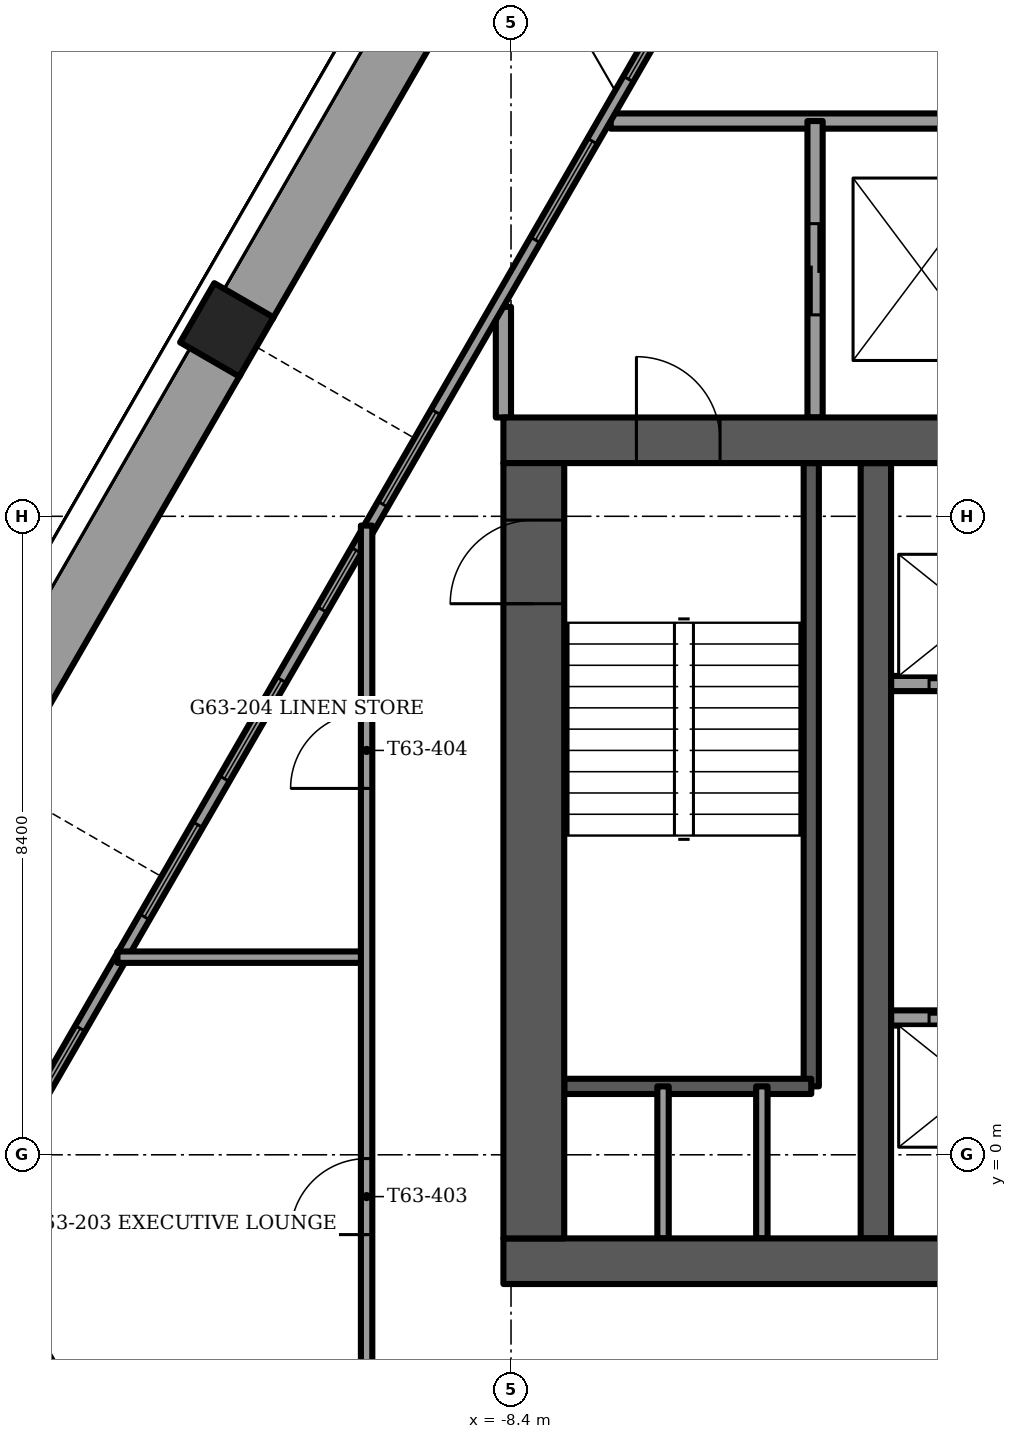
"""IFC4 building model, lengths in metres.
Left out: names, types, materials, properties, quantities, classifications, styles, units other than length and angle.
Written with IfcOpenShell. Run it as: python <this file> out.ifc"""

import sys

from ifc_helpers import new_model, si_unit, direction, frame, frame_2d, origin, origin_2d, place, context, subcontext, project, spatial, rectangle, extrude, element, fill, save


model = new_model("IFC4")
c1 = context("Model", 3, precision=1e-05, world=origin(), true_north=direction((0.0, 1.0)))
c2 = subcontext(c1, "Body", "Model", "MODEL_VIEW")
j1 = project(units=[si_unit("LENGTHUNIT", "METRE"), si_unit("PLANEANGLEUNIT", "RADIAN")], contexts=[c1])
p1 = place(None, origin())
s1 = spatial("IfcSite", under=j1, at=p1, CompositionType="ELEMENT")
p2 = place(p1, origin())
s2 = spatial("IfcBuilding", under=s1, at=p2, CompositionType="ELEMENT")
p3 = place(p2, frame((0.0, 0.0, 256.25)))
s3 = spatial("IfcBuildingStorey", under=s2, at=p3, CompositionType="ELEMENT", Elevation=256.25)
p4 = place(p3, frame((-12.139, 10.853, -1.2), z_axis=(0.0, 0.0, 1.0), x_axis=(0.5, 0.866025403784, 0.0)))
e1 = element("IfcColumn", 1, at=p4, inside=s3, PredefinedType="COLUMN", context=c2, shape_type="SweptSolid", body=[
    extrude(rectangle(XDim=0.9, YDim=0.9, at=origin_2d()), origin(), (0.0, 0.0, 1.0), 3.75),
])
p5 = place(p3, frame((-8.5, -1.4, -0.3), z_axis=(0.0, 0.0, 1.0), x_axis=(1.0, 0.0, 0.0)))
e2 = element("IfcWall", 2, at=p5, inside=s3, PredefinedType="SHEAR", context=c2, shape_type="SweptSolid", body=[
    extrude(rectangle(XDim=17.0, YDim=0.6, at=frame_2d((8.5, 0.0))), origin(), (0.0, 0.0, 1.0), 3.75),
])
p6 = place(p5, frame((7.7, 0.0, 0.0)))
e3 = element("IfcOpeningElement", 3, at=p6, cuts=e2, PredefinedType="OPENING", context=c2, shape_type="SweptSolid", body=[
    extrude(rectangle(XDim=1.6, YDim=2.1, at=frame_2d((0.8, 1.05))), frame((0.0, 0.3, 0.0), z_axis=(0.0, -1.0, 0.0), x_axis=(1.0, 0.0, 0.0)), (0.0, 0.0, 1.0), 0.6),
])
p7 = place(p3, frame((-8.5, 9.4, -0.3), z_axis=(0.0, 0.0, 1.0), x_axis=(1.0, 0.0, 0.0)))
e4 = element("IfcWall", 4, at=p7, inside=s3, PredefinedType="SHEAR", context=c2, shape_type="SweptSolid", body=[
    extrude(rectangle(XDim=17.0, YDim=0.6, at=frame_2d((8.5, 0.0))), origin(), (0.0, 0.0, 1.0), 3.75),
])
p8 = place(p7, frame((7.7, 0.0, 0.0)))
e5 = element("IfcOpeningElement", 5, at=p8, cuts=e4, PredefinedType="OPENING", context=c2, shape_type="SweptSolid", body=[
    extrude(rectangle(XDim=1.6, YDim=2.1, at=frame_2d((0.8, 1.05))), frame((0.0, 0.3, 0.0), z_axis=(0.0, -1.0, 0.0), x_axis=(1.0, 0.0, 0.0)), (0.0, 0.0, 1.0), 0.6),
])
p9 = place(p7, frame((1.75, 0.0, 0.0)))
e6 = element("IfcOpeningElement", 6, at=p9, cuts=e4, PredefinedType="OPENING", context=c2, shape_type="SweptSolid", body=[
    extrude(rectangle(XDim=1.1, YDim=2.1, at=frame_2d((0.55, 1.05))), frame((0.0, 0.3, 0.0), z_axis=(0.0, -1.0, 0.0), x_axis=(1.0, 0.0, 0.0)), (0.0, 0.0, 1.0), 0.6),
])
p10 = place(p7, frame((14.15, 0.0, 0.0)))
e7 = element("IfcOpeningElement", 7, at=p10, cuts=e4, PredefinedType="OPENING", context=c2, shape_type="SweptSolid", body=[
    extrude(rectangle(XDim=1.1, YDim=2.1, at=frame_2d((0.55, 1.05))), frame((0.0, 0.3, 0.0), z_axis=(0.0, -1.0, 0.0), x_axis=(1.0, 0.0, 0.0)), (0.0, 0.0, 1.0), 0.6),
])
p11 = place(p3, frame((-8.1, -1.1, -0.3), z_axis=(0.0, 0.0, 1.0), x_axis=(0.0, 1.0, 0.0)))
e8 = element("IfcWall", 8, at=p11, inside=s3, PredefinedType="SHEAR", context=c2, shape_type="SweptSolid", body=[
    extrude(rectangle(XDim=10.2, YDim=0.8, at=frame_2d((5.1, 0.0))), origin(), (0.0, 0.0, 1.0), 3.75),
])
p12 = place(p11, frame((8.35, 0.0, 0.0)))
e9 = element("IfcOpeningElement", 9, at=p12, cuts=e8, PredefinedType="OPENING", context=c2, shape_type="SweptSolid", body=[
    extrude(rectangle(XDim=1.1, YDim=2.1, at=frame_2d((0.55, 1.05))), frame((0.0, 0.4, 0.0), z_axis=(0.0, -1.0, 0.0), x_axis=(1.0, 0.0, 0.0)), (0.0, 0.0, 1.0), 0.8),
])
p13 = place(p3, frame((-3.6, -1.1, -0.3), z_axis=(0.0, 0.0, 1.0), x_axis=(0.0, 1.0, 0.0)))
e10 = element("IfcWall", 10, at=p13, inside=s3, PredefinedType="SHEAR", context=c2, shape_type="SweptSolid", body=[
    extrude(rectangle(XDim=10.2, YDim=0.4, at=frame_2d((5.1, 0.0))), origin(), (0.0, 0.0, 1.0), 3.75),
])
p14 = place(p3, frame((-8.92, 16.428, 0.0), z_axis=(0.0, 0.0, 1.0), x_axis=(-0.500026811154, -0.866009923804, 0.0)))
e11 = element("IfcWall", 11, at=p14, inside=s3, PredefinedType="PARAPET", context=c2, shape_type="SweptSolid", body=[
    extrude(rectangle(XDim=6.018, YDim=0.9, at=frame_2d((3.009, 0.0))), origin(), (0.0, 0.0, 1.0), 1.1),
])
p15 = place(p3, frame((-12.349, 10.489, 0.0), z_axis=(0.0, 0.0, 1.0), x_axis=(-0.500015433515, -0.866016493057, 0.0)))
e12 = element("IfcWall", 12, at=p15, inside=s3, PredefinedType="PARAPET", context=c2, shape_type="SweptSolid", body=[
    extrude(rectangle(XDim=5.819, YDim=0.9, at=frame_2d((2.909, 0.0))), origin(), (0.0, 0.0, 1.0), 1.1),
])
p16 = place(p3, frame((-5.909, 15.792, 0.0), z_axis=(0.0, 0.0, 1.0), x_axis=(-0.500006153997, -0.866021850744, 0.0)))
e13 = element("IfcWall", 13, at=p16, inside=s3, PredefinedType="SOLIDWALL", context=c2, shape_type="SweptSolid", body=[
    extrude(rectangle(XDim=18.673, YDim=0.15, at=frame_2d((9.336, 0.0))), origin(), (0.0, 0.0, 1.0), 3.45),
])
p17 = place(p16, frame((2.838, 0.0, 0.15)))
e14 = element("IfcOpeningElement", 14, at=p17, cuts=e13, PredefinedType="OPENING", context=c2, shape_type="SweptSolid", body=[
    extrude(rectangle(XDim=1.5, YDim=2.85, at=frame_2d((0.75, 1.425))), frame((0.0, 0.075, 0.0), z_axis=(0.0, -1.0, 0.0), x_axis=(1.0, 0.0, 0.0)), (0.0, 0.0, 1.0), 0.15),
])
p18 = place(p16, frame((9.053, 0.0, 0.15)))
e15 = element("IfcOpeningElement", 15, at=p18, cuts=e13, PredefinedType="OPENING", context=c2, shape_type="SweptSolid", body=[
    extrude(rectangle(XDim=0.9, YDim=2.85, at=frame_2d((0.45, 1.425))), frame((0.0, 0.075, 0.0), z_axis=(0.0, -1.0, 0.0), x_axis=(1.0, 0.0, 0.0)), (0.0, 0.0, 1.0), 0.15),
])
p19 = place(p16, frame((6.953, 0.0, 0.15)))
e16 = element("IfcOpeningElement", 16, at=p19, cuts=e13, PredefinedType="OPENING", context=c2, shape_type="SweptSolid", body=[
    extrude(rectangle(XDim=1.4, YDim=2.85, at=frame_2d((0.7, 1.425))), frame((0.0, 0.075, 0.0), z_axis=(0.0, -1.0, 0.0), x_axis=(1.0, 0.0, 0.0)), (0.0, 0.0, 1.0), 0.15),
])
p20 = place(p16, frame((11.022, 0.0, 0.15)))
e17 = element("IfcOpeningElement", 17, at=p20, cuts=e13, PredefinedType="OPENING", context=c2, shape_type="SweptSolid", body=[
    extrude(rectangle(XDim=1.5, YDim=2.85, at=frame_2d((0.75, 1.425))), frame((0.0, 0.075, 0.0), z_axis=(0.0, -1.0, 0.0), x_axis=(1.0, 0.0, 0.0)), (0.0, 0.0, 1.0), 0.15),
])
p21 = place(p16, frame((13.222, 0.0, 0.15)))
e18 = element("IfcOpeningElement", 18, at=p21, cuts=e13, PredefinedType="OPENING", context=c2, shape_type="SweptSolid", body=[
    extrude(rectangle(XDim=1.4, YDim=2.85, at=frame_2d((0.7, 1.425))), frame((0.0, 0.075, 0.0), z_axis=(0.0, -1.0, 0.0), x_axis=(1.0, 0.0, 0.0)), (0.0, 0.0, 1.0), 0.15),
])
p22 = place(p16, frame((0.394, 0.0, 0.15)))
e19 = element("IfcOpeningElement", 19, at=p22, cuts=e13, PredefinedType="OPENING", context=c2, shape_type="SweptSolid", body=[
    extrude(rectangle(XDim=1.5, YDim=2.73, at=frame_2d((0.75, 1.365))), frame((0.0, 0.075, 0.0), z_axis=(0.0, -1.0, 0.0), x_axis=(1.0, 0.0, 0.0)), (0.0, 0.0, 1.0), 0.15),
])
p23 = place(p16, frame((16.316, 0.0, 0.15)))
e20 = element("IfcOpeningElement", 20, at=p23, cuts=e13, PredefinedType="OPENING", context=c2, shape_type="SweptSolid", body=[
    extrude(rectangle(XDim=1.5, YDim=2.73, at=frame_2d((0.75, 1.365))), frame((0.0, 0.075, 0.0), z_axis=(0.0, -1.0, 0.0), x_axis=(1.0, 0.0, 0.0)), (0.0, 0.0, 1.0), 0.15),
])
p24 = place(p3, frame((-15.246, -1.444, 0.0), z_axis=(0.0, 0.0, 1.0), x_axis=(0.500005990458, -0.866021945164, 0.0)))
e21 = element("IfcWall", 21, at=p24, inside=s3, PredefinedType="SOLIDWALL", context=c2, shape_type="SweptSolid", body=[
    extrude(rectangle(XDim=12.745, YDim=0.15, at=frame_2d((6.373, 0.0))), origin(), (0.0, 0.0, 1.0), 3.45),
])
p25 = place(p24, frame((2.93, 0.0, 0.15)))
e22 = element("IfcOpeningElement", 22, at=p25, cuts=e21, PredefinedType="OPENING", context=c2, shape_type="SweptSolid", body=[
    extrude(rectangle(XDim=1.5, YDim=2.85, at=frame_2d((0.75, 1.425))), frame((0.0, 0.075, 0.0), z_axis=(0.0, -1.0, 0.0), x_axis=(1.0, 0.0, 0.0)), (0.0, 0.0, 1.0), 0.15),
])
p26 = place(p24, frame((4.673, 0.0, 0.15)))
e23 = element("IfcOpeningElement", 23, at=p26, cuts=e21, PredefinedType="OPENING", context=c2, shape_type="SweptSolid", body=[
    extrude(rectangle(XDim=1.4, YDim=2.85, at=frame_2d((0.7, 1.425))), frame((0.0, 0.075, 0.0), z_axis=(0.0, -1.0, 0.0), x_axis=(1.0, 0.0, 0.0)), (0.0, 0.0, 1.0), 0.15),
])
p27 = place(p24, frame((6.673, 0.0, 0.15)))
e24 = element("IfcOpeningElement", 24, at=p27, cuts=e21, PredefinedType="OPENING", context=c2, shape_type="SweptSolid", body=[
    extrude(rectangle(XDim=1.5, YDim=2.85, at=frame_2d((0.75, 1.425))), frame((0.0, 0.075, 0.0), z_axis=(0.0, -1.0, 0.0), x_axis=(1.0, 0.0, 0.0)), (0.0, 0.0, 1.0), 0.15),
])
p28 = place(p24, frame((8.873, 0.0, 0.15)))
e25 = element("IfcOpeningElement", 25, at=p28, cuts=e21, PredefinedType="OPENING", context=c2, shape_type="SweptSolid", body=[
    extrude(rectangle(XDim=1.4, YDim=2.85, at=frame_2d((0.7, 1.425))), frame((0.0, 0.075, 0.0), z_axis=(0.0, -1.0, 0.0), x_axis=(1.0, 0.0, 0.0)), (0.0, 0.0, 1.0), 0.15),
])
p29 = place(p24, frame((0.286, 0.0, 0.15)))
e26 = element("IfcOpeningElement", 26, at=p29, cuts=e21, PredefinedType="OPENING", context=c2, shape_type="SweptSolid", body=[
    extrude(rectangle(XDim=1.5, YDim=2.73, at=frame_2d((0.75, 1.365))), frame((0.0, 0.075, 0.0), z_axis=(0.0, -1.0, 0.0), x_axis=(1.0, 0.0, 0.0)), (0.0, 0.0, 1.0), 0.15),
])
p30 = place(p3, frame((-3.4, 1.8, 0.0), z_axis=(0.0, 0.0, 1.0), x_axis=(1.0, 0.0, 0.0)))
e27 = element("IfcWall", 27, at=p30, inside=s3, PredefinedType="PARTITIONING", context=c2, shape_type="SweptSolid", body=[
    extrude(rectangle(XDim=2.3, YDim=0.2, at=frame_2d((1.15, 0.0))), origin(), (0.0, 0.0, 1.0), 3.45),
])
p31 = place(p30, frame((0.5, 0.0, 0.0)))
e28 = element("IfcOpeningElement", 28, at=p31, cuts=e27, PredefinedType="OPENING", context=c2, shape_type="SweptSolid", body=[
    extrude(rectangle(XDim=1.2, YDim=2.1, at=frame_2d((0.6, 1.05))), frame((0.0, 0.1, 0.0), z_axis=(0.0, -1.0, 0.0), x_axis=(1.0, 0.0, 0.0)), (0.0, 0.0, 1.0), 0.2),
])
p32 = place(p3, frame((-3.4, 6.2, 0.0), z_axis=(0.0, 0.0, 1.0), x_axis=(1.0, 0.0, 0.0)))
e29 = element("IfcWall", 29, at=p32, inside=s3, PredefinedType="PARTITIONING", context=c2, shape_type="SweptSolid", body=[
    extrude(rectangle(XDim=2.3, YDim=0.2, at=frame_2d((1.15, 0.0))), origin(), (0.0, 0.0, 1.0), 3.45),
])
p33 = place(p32, frame((0.5, 0.0, 0.0)))
e30 = element("IfcOpeningElement", 30, at=p33, cuts=e29, PredefinedType="OPENING", context=c2, shape_type="SweptSolid", body=[
    extrude(rectangle(XDim=1.2, YDim=2.1, at=frame_2d((0.6, 1.05))), frame((0.0, 0.1, 0.0), z_axis=(0.0, -1.0, 0.0), x_axis=(1.0, 0.0, 0.0)), (0.0, 0.0, 1.0), 0.2),
])
p34 = place(p3, frame((-4.45, 0.9, -0.3), z_axis=(0.0, 0.0, 1.0), x_axis=(0.0, 1.0, 0.0)))
e31 = element("IfcWall", 31, at=p34, inside=s3, PredefinedType="SOLIDWALL", context=c2, shape_type="SweptSolid", body=[
    extrude(rectangle(XDim=8.2, YDim=0.2, at=frame_2d((4.1, 0.0))), origin(), (0.0, 0.0, 1.0), 3.75),
])
p35 = place(p3, frame((-7.7, 0.9, -0.3), z_axis=(0.0, 0.0, 1.0), x_axis=(1.0, 0.0, 0.0)))
e32 = element("IfcWall", 32, at=p35, inside=s3, PredefinedType="SOLIDWALL", context=c2, shape_type="SweptSolid", body=[
    extrude(rectangle(XDim=3.25, YDim=0.2, at=frame_2d((1.625, 0.0))), origin(), (0.0, 0.0, 1.0), 3.75),
])
for number, where, z_axis, x_axis in (
    (33, (-6.4, -1.1, 0.0), (0.0, 0.0, 1.0), (0.0, 1.0, 0.0)),
    (34, (-5.1, -1.1, 0.0), (0.0, 0.0, 1.0), (0.0, 1.0, 0.0)),
):
    element("IfcWall", number, at=place(p3, frame(where, z_axis=z_axis, x_axis=x_axis)), inside=s3, PredefinedType="PARTITIONING", context=c2, shape_type="SweptSolid", body=[
        extrude(rectangle(XDim=2.0, YDim=0.15, at=frame_2d((1.0, 0.0))), origin(), (0.0, 0.0, 1.0), 3.45),
    ])
p36 = place(p3, frame((-7.089, 13.6, 0.0), z_axis=(0.0, 0.0, 1.0), x_axis=(1.0, 0.0, 0.0)))
e35 = element("IfcWall", 35, at=p36, inside=s3, PredefinedType="PARTITIONING", context=c2, shape_type="SweptSolid", body=[
    extrude(rectangle(XDim=14.177, YDim=0.2, at=frame_2d((7.089, 0.0))), origin(), (0.0, 0.0, 1.0), 3.45),
])
p37 = place(p36, frame((6.589, 0.0, 0.0)))
e36 = element("IfcOpeningElement", 36, at=p37, cuts=e35, PredefinedType="OPENING", context=c2, shape_type="SweptSolid", body=[
    extrude(rectangle(XDim=1.0, YDim=2.1, at=frame_2d((0.5, 1.05))), frame((0.0, 0.1, 0.0), z_axis=(0.0, -1.0, 0.0), x_axis=(1.0, 0.0, 0.0)), (0.0, 0.0, 1.0), 0.2),
])
p38 = place(p3, frame((-8.5, 9.7, 0.0), z_axis=(0.0, 0.0, 1.0), x_axis=(0.0, 1.0, 0.0)))
e37 = element("IfcWall", 37, at=p38, inside=s3, PredefinedType="PARTITIONING", context=c2, shape_type="SweptSolid", body=[
    extrude(rectangle(XDim=1.456, YDim=0.2, at=frame_2d((0.728, 0.0))), origin(), (0.0, 0.0, 1.0), 3.45),
])
p39 = place(p3, frame((-4.4, 9.7, 0.0), z_axis=(0.0, 0.0, 1.0), x_axis=(0.0, 1.0, 0.0)))
e38 = element("IfcWall", 38, at=p39, inside=s3, PredefinedType="PARTITIONING", context=c2, shape_type="SweptSolid", body=[
    extrude(rectangle(XDim=3.9, YDim=0.2, at=frame_2d((1.95, 0.0))), origin(), (0.0, 0.0, 1.0), 3.45),
])
p40 = place(p39, frame((1.35, 0.0, 0.0)))
e39 = element("IfcOpeningElement", 39, at=p40, cuts=e38, PredefinedType="OPENING", context=c2, shape_type="SweptSolid", body=[
    extrude(rectangle(XDim=1.2, YDim=2.1, at=frame_2d((0.6, 1.05))), frame((0.0, 0.1, 0.0), z_axis=(0.0, -1.0, 0.0), x_axis=(1.0, 0.0, 0.0)), (0.0, 0.0, 1.0), 0.2),
])
p41 = place(p3, frame((-13.578, 2.6, 0.0), z_axis=(0.0, 0.0, 1.0), x_axis=(1.0, 0.0, 0.0)))
e40 = element("IfcWall", 40, at=p41, inside=s3, PredefinedType="PARTITIONING", context=c2, shape_type="SweptSolid", body=[
    extrude(rectangle(XDim=3.278, YDim=0.15, at=frame_2d((1.639, 0.0))), origin(), (0.0, 0.0, 1.0), 3.45),
])
p42 = place(p3, frame((-10.3, -3.7, 0.0), z_axis=(0.0, 0.0, 1.0), x_axis=(0.0, 1.0, 0.0)))
e41 = element("IfcWall", 41, at=p42, inside=s3, PredefinedType="PARTITIONING", context=c2, shape_type="SweptSolid", body=[
    extrude(rectangle(XDim=11.978, YDim=0.15, at=frame_2d((5.989, 0.0))), origin(), (0.0, 0.0, 1.0), 3.45),
])
p43 = place(p42, frame((2.65, 0.0, 0.0)))
e42 = element("IfcOpeningElement", 42, at=p43, cuts=e41, PredefinedType="OPENING", context=c2, shape_type="SweptSolid", body=[
    extrude(rectangle(XDim=1.0, YDim=2.1, at=frame_2d((0.5, 1.05))), frame((0.0, 0.075, 0.0), z_axis=(0.0, -1.0, 0.0), x_axis=(1.0, 0.0, 0.0)), (0.0, 0.0, 1.0), 0.15),
])
p44 = place(p42, frame((8.52, 0.0, 0.0)))
e43 = element("IfcOpeningElement", 43, at=p44, cuts=e41, PredefinedType="OPENING", context=c2, shape_type="SweptSolid", body=[
    extrude(rectangle(XDim=1.0, YDim=2.1, at=frame_2d((0.5, 1.05))), frame((0.0, 0.075, 0.0), z_axis=(0.0, -1.0, 0.0), x_axis=(1.0, 0.0, 0.0)), (0.0, 0.0, 1.0), 0.15),
])
p45 = place(p17, origin())
e44 = element("IfcWindow", 44, at=p45, inside=s3, PartitioningType="SINGLE_PANEL", PredefinedType="WINDOW", context=c2, shape_type="SweptSolid", body=[
    extrude(rectangle(XDim=1.5, YDim=2.85, at=frame_2d((0.75, 1.425))), frame((0.0, 0.03, 0.0), z_axis=(0.0, -1.0, 0.0), x_axis=(1.0, 0.0, 0.0)), (0.0, 0.0, 1.0), 0.06),
])
fill(e14, e44)
p46 = place(p18, origin())
e45 = element("IfcWindow", 45, at=p46, inside=s3, PartitioningType="SINGLE_PANEL", PredefinedType="WINDOW", context=c2, shape_type="SweptSolid", body=[
    extrude(rectangle(XDim=0.9, YDim=2.85, at=frame_2d((0.45, 1.425))), frame((0.0, 0.03, 0.0), z_axis=(0.0, -1.0, 0.0), x_axis=(1.0, 0.0, 0.0)), (0.0, 0.0, 1.0), 0.06),
])
fill(e15, e45)
p47 = place(p19, origin())
e46 = element("IfcWindow", 46, at=p47, inside=s3, PartitioningType="SINGLE_PANEL", PredefinedType="WINDOW", context=c2, shape_type="SweptSolid", body=[
    extrude(rectangle(XDim=1.4, YDim=2.85, at=frame_2d((0.7, 1.425))), frame((0.0, 0.03, 0.0), z_axis=(0.0, -1.0, 0.0), x_axis=(1.0, 0.0, 0.0)), (0.0, 0.0, 1.0), 0.06),
])
fill(e16, e46)
p48 = place(p20, origin())
e47 = element("IfcWindow", 47, at=p48, inside=s3, PartitioningType="SINGLE_PANEL", PredefinedType="WINDOW", context=c2, shape_type="SweptSolid", body=[
    extrude(rectangle(XDim=1.5, YDim=2.85, at=frame_2d((0.75, 1.425))), frame((0.0, 0.03, 0.0), z_axis=(0.0, -1.0, 0.0), x_axis=(1.0, 0.0, 0.0)), (0.0, 0.0, 1.0), 0.06),
])
fill(e17, e47)
p49 = place(p21, origin())
e48 = element("IfcWindow", 48, at=p49, inside=s3, PartitioningType="SINGLE_PANEL", PredefinedType="WINDOW", context=c2, shape_type="SweptSolid", body=[
    extrude(rectangle(XDim=1.4, YDim=2.85, at=frame_2d((0.7, 1.425))), frame((0.0, 0.03, 0.0), z_axis=(0.0, -1.0, 0.0), x_axis=(1.0, 0.0, 0.0)), (0.0, 0.0, 1.0), 0.06),
])
fill(e18, e48)
p50 = place(p22, origin())
e49 = element("IfcWindow", 49, at=p50, inside=s3, PartitioningType="SINGLE_PANEL", PredefinedType="WINDOW", context=c2, shape_type="SweptSolid", body=[
    extrude(rectangle(XDim=1.5, YDim=2.73, at=frame_2d((0.75, 1.365))), frame((0.0, 0.03, 0.0), z_axis=(0.0, -1.0, 0.0), x_axis=(1.0, 0.0, 0.0)), (0.0, 0.0, 1.0), 0.06),
])
fill(e19, e49)
p51 = place(p23, origin())
e50 = element("IfcWindow", 50, at=p51, inside=s3, PartitioningType="SINGLE_PANEL", PredefinedType="WINDOW", context=c2, shape_type="SweptSolid", body=[
    extrude(rectangle(XDim=1.5, YDim=2.73, at=frame_2d((0.75, 1.365))), frame((0.0, 0.03, 0.0), z_axis=(0.0, -1.0, 0.0), x_axis=(1.0, 0.0, 0.0)), (0.0, 0.0, 1.0), 0.06),
])
fill(e20, e50)
p52 = place(p29, origin())
e51 = element("IfcWindow", 51, at=p52, inside=s3, PartitioningType="SINGLE_PANEL", PredefinedType="WINDOW", context=c2, shape_type="SweptSolid", body=[
    extrude(rectangle(XDim=1.5, YDim=2.73, at=frame_2d((0.75, 1.365))), frame((0.0, 0.03, 0.0), z_axis=(0.0, -1.0, 0.0), x_axis=(1.0, 0.0, 0.0)), (0.0, 0.0, 1.0), 0.06),
])
fill(e26, e51)
p53 = place(p31, origin())
e52 = element("IfcDoor", 52, at=p53, inside=s3, OperationType="SLIDING_TO_LEFT", PredefinedType="DOOR", context=c2, shape_type="SweptSolid", body=[
    extrude(rectangle(XDim=1.2, YDim=2.1, at=frame_2d((0.6, 1.05))), frame((0.0, 0.025, 0.0), z_axis=(0.0, -1.0, 0.0), x_axis=(1.0, 0.0, 0.0)), (0.0, 0.0, 1.0), 0.05),
])
fill(e28, e52)
p54 = place(p33, origin())
e53 = element("IfcDoor", 53, at=p54, inside=s3, OperationType="SLIDING_TO_LEFT", PredefinedType="DOOR", context=c2, shape_type="SweptSolid", body=[
    extrude(rectangle(XDim=1.2, YDim=2.1, at=frame_2d((0.6, 1.05))), frame((0.0, 0.025, 0.0), z_axis=(0.0, -1.0, 0.0), x_axis=(1.0, 0.0, 0.0)), (0.0, 0.0, 1.0), 0.05),
])
fill(e30, e53)
p55 = place(p9, origin())
e54 = element("IfcDoor", 54, at=p55, inside=s3, OperationType="SINGLE_SWING_LEFT", PredefinedType="DOOR", context=c2, shape_type="SweptSolid", body=[
    extrude(rectangle(XDim=1.1, YDim=2.1, at=frame_2d((0.55, 1.05))), frame((0.0, 0.025, 0.0), z_axis=(0.0, -1.0, 0.0), x_axis=(1.0, 0.0, 0.0)), (0.0, 0.0, 1.0), 0.05),
])
fill(e6, e54)
p56 = place(p12, origin())
e55 = element("IfcDoor", 55, at=p56, inside=s3, OperationType="SINGLE_SWING_RIGHT", PredefinedType="DOOR", context=c2, shape_type="SweptSolid", body=[
    extrude(rectangle(XDim=1.1, YDim=2.1, at=frame_2d((0.55, 1.05))), frame((0.0, 0.025, 0.0), z_axis=(0.0, -1.0, 0.0), x_axis=(1.0, 0.0, 0.0)), (0.0, 0.0, 1.0), 0.05),
])
fill(e9, e55)
p57 = place(p40, origin())
e56 = element("IfcDoor", 56, at=p57, inside=s3, OperationType="SLIDING_TO_LEFT", PredefinedType="DOOR", context=c2, shape_type="SweptSolid", body=[
    extrude(rectangle(XDim=1.2, YDim=2.1, at=frame_2d((0.6, 1.05))), frame((0.0, 0.025, 0.0), z_axis=(0.0, -1.0, 0.0), x_axis=(1.0, 0.0, 0.0)), (0.0, 0.0, 1.0), 0.05),
])
fill(e39, e56)
p58 = place(p43, origin())
e57 = element("IfcDoor", 57, at=p58, inside=s3, OperationType="SINGLE_SWING_RIGHT", PredefinedType="DOOR", context=c2, shape_type="SweptSolid", body=[
    extrude(rectangle(XDim=1.0, YDim=2.1, at=frame_2d((0.5, 1.05))), frame((0.0, 0.025, 0.0), z_axis=(0.0, -1.0, 0.0), x_axis=(1.0, 0.0, 0.0)), (0.0, 0.0, 1.0), 0.05),
])
fill(e42, e57)
p59 = place(p44, origin())
e58 = element("IfcDoor", 58, at=p59, inside=s3, OperationType="SINGLE_SWING_LEFT", PredefinedType="DOOR", context=c2, shape_type="SweptSolid", body=[
    extrude(rectangle(XDim=1.0, YDim=2.1, at=frame_2d((0.5, 1.05))), frame((0.0, 0.025, 0.0), z_axis=(0.0, -1.0, 0.0), x_axis=(1.0, 0.0, 0.0)), (0.0, 0.0, 1.0), 0.05),
])
fill(e43, e58)
save(model, sys.argv[1])
